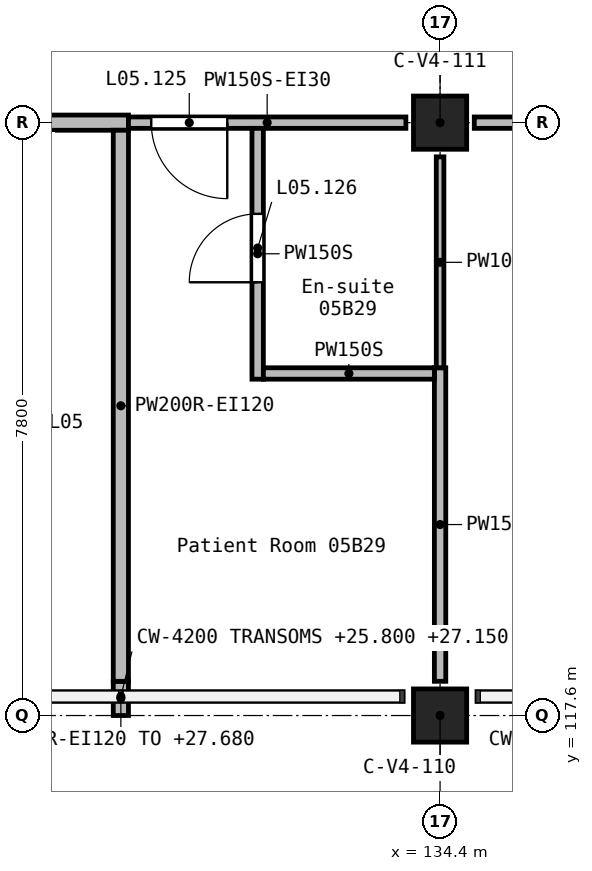
"""IFC4 building model, lengths in metres.
Left out: names, types, materials, properties, quantities, classifications, styles, units other than length and angle.
Written with IfcOpenShell. Run it as: python <this file> out.ifc"""

import sys

from ifc_helpers import new_model, si_unit, direction, frame, frame_2d, origin, origin_2d, place, context, subcontext, project, spatial, rectangle, extrude, element, fill, save


model = new_model("IFC4")
c1 = context("Model", 3, precision=1e-05, world=origin(), true_north=direction((0.0, 1.0)))
c2 = subcontext(c1, "Body", "Model", "MODEL_VIEW")
j1 = project(units=[si_unit("LENGTHUNIT", "METRE"), si_unit("PLANEANGLEUNIT", "RADIAN")], contexts=[c1])
p1 = place(None, origin())
s1 = spatial("IfcSite", under=j1, at=p1, CompositionType="ELEMENT")
p2 = place(p1, origin())
s2 = spatial("IfcBuilding", under=s1, at=p2, CompositionType="ELEMENT")
p3 = place(p2, frame((0.0, 0.0, 24.9)))
s3 = spatial("IfcBuildingStorey", under=s2, at=p3, CompositionType="ELEMENT", Elevation=24.9)
for number, where, z_axis, x_axis in (
    (1, (134.4, 117.6, 0.0), (0.0, 0.0, 1.0), (1.0, 0.0, 0.0)),
    (2, (134.4, 125.4, 0.0), (0.0, 0.0, 1.0), (1.0, 0.0, 0.0)),
):
    element("IfcColumn", number, at=place(p3, frame(where, z_axis=z_axis, x_axis=x_axis)), inside=s3, PredefinedType="COLUMN", context=c2, shape_type="SweptSolid", body=[
        extrude(rectangle(XDim=0.7, YDim=0.7, at=origin_2d()), origin(), (0.0, 0.0, 1.0), 3.9),
    ])
p4 = place(p3, frame((126.45, 125.4, 0.0), z_axis=(0.0, 0.0, 1.0), x_axis=(1.0, 0.0, 0.0)))
e3 = element("IfcWall", 3, at=p4, inside=s3, PredefinedType="SOLIDWALL", context=c2, shape_type="SweptSolid", body=[
    extrude(rectangle(XDim=3.85, YDim=0.2, at=frame_2d((1.925, 0.0))), origin(), (0.0, 0.0, 1.0), 3.6),
])
p5 = place(p4, frame((1.15, 0.0, 0.0)))
e4 = element("IfcOpeningElement", 4, at=p5, cuts=e3, PredefinedType="OPENING", context=c2, shape_type="SweptSolid", body=[
    extrude(rectangle(XDim=1.0, YDim=2.1, at=frame_2d((0.5, 1.05))), frame((0.0, 0.11, 0.0), z_axis=(0.0, -1.0, 0.0), x_axis=(1.0, 0.0, 0.0)), (0.0, 0.0, 1.0), 0.22),
])
p6 = place(p3, frame((130.2, 117.6, 0.0), z_axis=(0.0, 0.0, 1.0), x_axis=(0.0, 1.0, 0.0)))
e5 = element("IfcWall", 5, at=p6, inside=s3, PredefinedType="SOLIDWALL", context=c2, shape_type="SweptSolid", body=[
    extrude(rectangle(XDim=0.45, YDim=0.2, at=frame_2d((0.225, 0.0))), origin(), (0.0, 0.0, 1.0), 2.78),
])
p7 = place(p3, frame((130.2, 118.05, 0.0), z_axis=(0.0, 0.0, 1.0), x_axis=(0.0, 1.0, 0.0)))
e6 = element("IfcWall", 6, at=p7, inside=s3, PredefinedType="SOLIDWALL", context=c2, shape_type="SweptSolid", body=[
    extrude(rectangle(XDim=7.25, YDim=0.2, at=frame_2d((3.625, 0.0))), origin(), (0.0, 0.0, 1.0), 3.6),
])
p8 = place(p3, frame((142.35, 125.4, 0.0), z_axis=(0.0, 0.0, 1.0), x_axis=(-1.0, 0.0, 0.0)))
e7 = element("IfcWall", 7, at=p8, inside=s3, PredefinedType="PARTITIONING", context=c2, shape_type="SweptSolid", body=[
    extrude(rectangle(XDim=7.5, YDim=0.15, at=frame_2d((3.75, 0.0))), origin(), (0.0, 0.0, 1.0), 3.6),
])
p9 = place(p8, frame((3.9, 0.0, 0.0)))
e8 = element("IfcOpeningElement", 8, at=p9, cuts=e7, PredefinedType="OPENING", context=c2, shape_type="SweptSolid", body=[
    extrude(rectangle(XDim=1.8, YDim=2.1, at=frame_2d((0.9, 1.05))), frame((0.0, 0.085, 0.0), z_axis=(0.0, -1.0, 0.0), x_axis=(1.0, 0.0, 0.0)), (0.0, 0.0, 1.0), 0.17),
])
p10 = place(p3, frame((133.95, 125.4, 0.0), z_axis=(0.0, 0.0, 1.0), x_axis=(-1.0, 0.0, 0.0)))
e9 = element("IfcWall", 9, at=p10, inside=s3, PredefinedType="PARTITIONING", context=c2, shape_type="SweptSolid", body=[
    extrude(rectangle(XDim=3.65, YDim=0.15, at=frame_2d((1.825, 0.0))), origin(), (0.0, 0.0, 1.0), 3.6),
])
p11 = place(p10, frame((2.35, 0.0, 0.0)))
e10 = element("IfcOpeningElement", 10, at=p11, cuts=e9, PredefinedType="OPENING", context=c2, shape_type="SweptSolid", body=[
    extrude(rectangle(XDim=1.0, YDim=2.1, at=frame_2d((0.5, 1.05))), frame((0.0, 0.085, 0.0), z_axis=(0.0, -1.0, 0.0), x_axis=(1.0, 0.0, 0.0)), (0.0, 0.0, 1.0), 0.17),
])
p12 = place(p3, frame((134.4, 118.05, 0.0), z_axis=(0.0, 0.0, 1.0), x_axis=(0.0, 1.0, 0.0)))
e11 = element("IfcWall", 11, at=p12, inside=s3, PredefinedType="PARTITIONING", context=c2, shape_type="SweptSolid", body=[
    extrude(rectangle(XDim=4.125, YDim=0.15, at=frame_2d((2.062, 0.0))), origin(), (0.0, 0.0, 1.0), 3.6),
])
p13 = place(p3, frame((132.0, 122.025, 0.0), z_axis=(0.0, 0.0, 1.0), x_axis=(0.0, 1.0, 0.0)))
e12 = element("IfcWall", 12, at=p13, inside=s3, PredefinedType="PARTITIONING", context=c2, shape_type="SweptSolid", body=[
    extrude(rectangle(XDim=3.3, YDim=0.15, at=frame_2d((1.65, 0.0))), origin(), (0.0, 0.0, 1.0), 3.6),
])
p14 = place(p13, frame((1.275, 0.0, 0.0)))
e13 = element("IfcOpeningElement", 13, at=p14, cuts=e12, PredefinedType="OPENING", context=c2, shape_type="SweptSolid", body=[
    extrude(rectangle(XDim=0.9, YDim=2.1, at=frame_2d((0.45, 1.05))), frame((0.0, 0.085, 0.0), z_axis=(0.0, -1.0, 0.0), x_axis=(1.0, 0.0, 0.0)), (0.0, 0.0, 1.0), 0.17),
])
p15 = place(p3, frame((132.075, 122.1, 0.0), z_axis=(0.0, 0.0, 1.0), x_axis=(1.0, 0.0, 0.0)))
e14 = element("IfcWall", 14, at=p15, inside=s3, PredefinedType="PARTITIONING", context=c2, shape_type="SweptSolid", body=[
    extrude(rectangle(XDim=2.25, YDim=0.15, at=frame_2d((1.125, 0.0))), origin(), (0.0, 0.0, 1.0), 3.6),
])
p16 = place(p3, frame((134.4, 122.175, 0.0), z_axis=(0.0, 0.0, 1.0), x_axis=(0.0, 1.0, 0.0)))
e15 = element("IfcWall", 15, at=p16, inside=s3, PredefinedType="PARTITIONING", context=c2, shape_type="SweptSolid", body=[
    extrude(rectangle(XDim=2.775, YDim=0.1, at=frame_2d((1.387, 0.0))), origin(), (0.0, 0.0, 1.0), 3.6),
])
p17 = place(p11, origin())
e16 = element("IfcDoor", 16, at=p17, inside=s3, OperationType="SINGLE_SWING_RIGHT", PredefinedType="DOOR", context=c2, shape_type="SweptSolid", body=[
    extrude(rectangle(XDim=1.0, YDim=2.1, at=frame_2d((0.5, 1.05))), frame((0.0, 0.025, 0.0), z_axis=(0.0, -1.0, 0.0), x_axis=(1.0, 0.0, 0.0)), (0.0, 0.0, 1.0), 0.05),
])
fill(e10, e16)
p18 = place(p14, frame((0.9, 0.0, 0.0), z_axis=(0.0, 0.0, 1.0), x_axis=(-1.0, 0.0, 0.0)))
e17 = element("IfcDoor", 17, at=p18, inside=s3, OperationType="SINGLE_SWING_LEFT", PredefinedType="DOOR", context=c2, shape_type="SweptSolid", body=[
    extrude(rectangle(XDim=0.9, YDim=2.1, at=frame_2d((0.45, 1.05))), frame((0.0, 0.025, 0.0), z_axis=(0.0, -1.0, 0.0), x_axis=(1.0, 0.0, 0.0)), (0.0, 0.0, 1.0), 0.05),
])
fill(e13, e17)
save(model, sys.argv[1])
